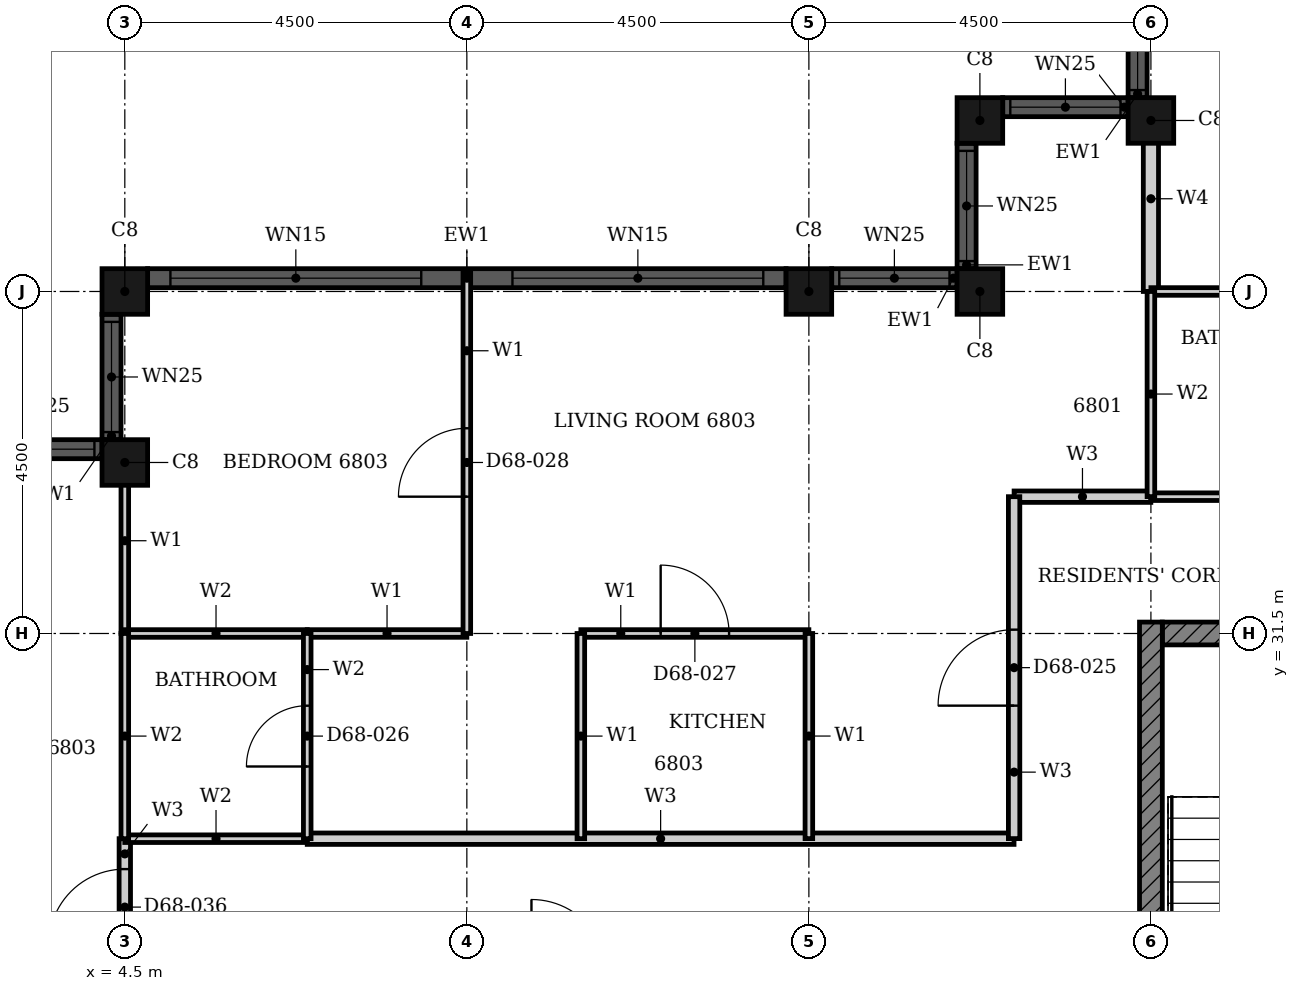
"""IFC4 building model, lengths in metres.
Left out: names, types, materials, properties, quantities, classifications, styles, units other than length and angle.
Written with IfcOpenShell. Run it as: python <this file> out.ifc"""

import sys

from ifc_helpers import new_model, si_unit, direction, frame, frame_2d, origin, origin_2d, place, context, subcontext, project, spatial, rectangle, hollow_rectangle, extrude, element, fill, save


model = new_model("IFC4")
c1 = context("Model", 3, precision=1e-05, world=origin(), true_north=direction((0.0, 1.0)))
c2 = subcontext(c1, "Body", "Model", "MODEL_VIEW")
j1 = project(units=[si_unit("LENGTHUNIT", "METRE"), si_unit("PLANEANGLEUNIT", "RADIAN")], contexts=[c1])
p1 = place(None, origin())
s1 = spatial("IfcSite", under=j1, at=p1, CompositionType="ELEMENT")
p2 = place(p1, origin())
s2 = spatial("IfcBuilding", under=s1, at=p2, CompositionType="ELEMENT")
p3 = place(p2, frame((0.0, 0.0, 267.5)))
s3 = spatial("IfcBuildingStorey", under=s2, at=p3, CompositionType="ELEMENT", Elevation=267.5)
for number, where, z_axis, x_axis in (
    (1, (18.0, 38.25, 0.0), (0.0, 0.0, 1.0), (1.0, 0.0, 0.0)),
    (2, (15.75, 38.25, 0.0), (0.0, 0.0, 1.0), (1.0, 0.0, 0.0)),
    (3, (15.75, 36.0, 0.0), (0.0, 0.0, 1.0), (1.0, 0.0, 0.0)),
    (4, (13.5, 36.0, 0.0), (0.0, 0.0, 1.0), (1.0, 0.0, 0.0)),
    (5, (4.5, 36.0, 0.0), (0.0, 0.0, 1.0), (1.0, 0.0, 0.0)),
    (6, (4.5, 33.75, 0.0), (0.0, 0.0, 1.0), (1.0, 0.0, 0.0)),
):
    element("IfcColumn", number, at=place(p3, frame(where, z_axis=z_axis, x_axis=x_axis)), inside=s3, PredefinedType="COLUMN", context=c2, shape_type="SweptSolid", body=[
        extrude(hollow_rectangle(XDim=0.6, YDim=0.6, WallThickness=0.02, at=origin_2d()), origin(), (0.0, 0.0, 1.0), 3.7),
    ])
p4 = place(p3, frame((17.825, 40.2, 0.0), z_axis=(0.0, 0.0, 1.0), x_axis=(0.0, -1.0, 0.0)))
e7 = element("IfcWall", 7, at=p4, inside=s3, PredefinedType="SOLIDWALL", context=c2, shape_type="SweptSolid", body=[
    extrude(rectangle(XDim=1.65, YDim=0.25, at=frame_2d((0.825, 0.0))), origin(), (0.0, 0.0, 1.0), 3.7),
])
p5 = place(p4, frame((0.1, 0.0, 0.9)))
e8 = element("IfcOpeningElement", 8, at=p5, cuts=e7, PredefinedType="OPENING", context=c2, shape_type="SweptSolid", body=[
    extrude(rectangle(XDim=1.45, YDim=1.85, at=frame_2d((0.725, 0.925))), frame((0.0, 0.135, 0.0), z_axis=(0.0, -1.0, 0.0), x_axis=(1.0, 0.0, 0.0)), (0.0, 0.0, 1.0), 0.27),
])
p6 = place(p3, frame((17.7, 38.425, 0.0), z_axis=(0.0, 0.0, 1.0), x_axis=(-1.0, 0.0, 0.0)))
e9 = element("IfcWall", 9, at=p6, inside=s3, PredefinedType="SOLIDWALL", context=c2, shape_type="SweptSolid", body=[
    extrude(rectangle(XDim=1.65, YDim=0.25, at=frame_2d((0.825, 0.0))), origin(), (0.0, 0.0, 1.0), 3.7),
])
p7 = place(p6, frame((0.1, 0.0, 0.9)))
e10 = element("IfcOpeningElement", 10, at=p7, cuts=e9, PredefinedType="OPENING", context=c2, shape_type="SweptSolid", body=[
    extrude(rectangle(XDim=1.45, YDim=1.85, at=frame_2d((0.725, 0.925))), frame((0.0, 0.135, 0.0), z_axis=(0.0, -1.0, 0.0), x_axis=(1.0, 0.0, 0.0)), (0.0, 0.0, 1.0), 0.27),
])
p8 = place(p3, frame((15.575, 37.95, 0.0), z_axis=(0.0, 0.0, 1.0), x_axis=(0.0, -1.0, 0.0)))
e11 = element("IfcWall", 11, at=p8, inside=s3, PredefinedType="SOLIDWALL", context=c2, shape_type="SweptSolid", body=[
    extrude(rectangle(XDim=1.65, YDim=0.25, at=frame_2d((0.825, 0.0))), origin(), (0.0, 0.0, 1.0), 3.7),
])
p9 = place(p8, frame((0.1, 0.0, 0.9)))
e12 = element("IfcOpeningElement", 12, at=p9, cuts=e11, PredefinedType="OPENING", context=c2, shape_type="SweptSolid", body=[
    extrude(rectangle(XDim=1.45, YDim=1.85, at=frame_2d((0.725, 0.925))), frame((0.0, 0.135, 0.0), z_axis=(0.0, -1.0, 0.0), x_axis=(1.0, 0.0, 0.0)), (0.0, 0.0, 1.0), 0.27),
])
p10 = place(p3, frame((15.45, 36.175, 0.0), z_axis=(0.0, 0.0, 1.0), x_axis=(-1.0, 0.0, 0.0)))
e13 = element("IfcWall", 13, at=p10, inside=s3, PredefinedType="SOLIDWALL", context=c2, shape_type="SweptSolid", body=[
    extrude(rectangle(XDim=1.65, YDim=0.25, at=frame_2d((0.825, 0.0))), origin(), (0.0, 0.0, 1.0), 3.7),
])
p11 = place(p10, frame((0.1, 0.0, 0.9)))
e14 = element("IfcOpeningElement", 14, at=p11, cuts=e13, PredefinedType="OPENING", context=c2, shape_type="SweptSolid", body=[
    extrude(rectangle(XDim=1.45, YDim=1.85, at=frame_2d((0.725, 0.925))), frame((0.0, 0.135, 0.0), z_axis=(0.0, -1.0, 0.0), x_axis=(1.0, 0.0, 0.0)), (0.0, 0.0, 1.0), 0.27),
])
p12 = place(p3, frame((13.2, 36.175, 0.0), z_axis=(0.0, 0.0, 1.0), x_axis=(-1.0, 0.0, 0.0)))
e15 = element("IfcWall", 15, at=p12, inside=s3, PredefinedType="SOLIDWALL", context=c2, shape_type="SweptSolid", body=[
    extrude(rectangle(XDim=8.4, YDim=0.25, at=frame_2d((4.2, 0.0))), origin(), (0.0, 0.0, 1.0), 3.7),
])
p13 = place(p12, frame((0.3, 0.0, 0.45)))
e16 = element("IfcOpeningElement", 16, at=p13, cuts=e15, PredefinedType="OPENING", context=c2, shape_type="SweptSolid", body=[
    extrude(rectangle(XDim=3.3, YDim=2.3, at=frame_2d((1.65, 1.15))), frame((0.0, 0.135, 0.0), z_axis=(0.0, -1.0, 0.0), x_axis=(1.0, 0.0, 0.0)), (0.0, 0.0, 1.0), 0.27),
])
p14 = place(p12, frame((4.8, 0.0, 0.45)))
e17 = element("IfcOpeningElement", 17, at=p14, cuts=e15, PredefinedType="OPENING", context=c2, shape_type="SweptSolid", body=[
    extrude(rectangle(XDim=3.3, YDim=2.3, at=frame_2d((1.65, 1.15))), frame((0.0, 0.135, 0.0), z_axis=(0.0, -1.0, 0.0), x_axis=(1.0, 0.0, 0.0)), (0.0, 0.0, 1.0), 0.27),
])
p15 = place(p3, frame((4.325, 35.7, 0.0), z_axis=(0.0, 0.0, 1.0), x_axis=(0.0, -1.0, 0.0)))
e18 = element("IfcWall", 18, at=p15, inside=s3, PredefinedType="SOLIDWALL", context=c2, shape_type="SweptSolid", body=[
    extrude(rectangle(XDim=1.65, YDim=0.25, at=frame_2d((0.825, 0.0))), origin(), (0.0, 0.0, 1.0), 3.7),
])
p16 = place(p15, frame((0.1, 0.0, 0.9)))
e19 = element("IfcOpeningElement", 19, at=p16, cuts=e18, PredefinedType="OPENING", context=c2, shape_type="SweptSolid", body=[
    extrude(rectangle(XDim=1.45, YDim=1.85, at=frame_2d((0.725, 0.925))), frame((0.0, 0.135, 0.0), z_axis=(0.0, -1.0, 0.0), x_axis=(1.0, 0.0, 0.0)), (0.0, 0.0, 1.0), 0.27),
])
p17 = place(p3, frame((4.2, 33.925, 0.0), z_axis=(0.0, 0.0, 1.0), x_axis=(-1.0, 0.0, 0.0)))
e20 = element("IfcWall", 20, at=p17, inside=s3, PredefinedType="SOLIDWALL", context=c2, shape_type="SweptSolid", body=[
    extrude(rectangle(XDim=1.65, YDim=0.25, at=frame_2d((0.825, 0.0))), origin(), (0.0, 0.0, 1.0), 3.7),
])
p18 = place(p17, frame((0.1, 0.0, 0.9)))
e21 = element("IfcOpeningElement", 21, at=p18, cuts=e20, PredefinedType="OPENING", context=c2, shape_type="SweptSolid", body=[
    extrude(rectangle(XDim=1.45, YDim=1.85, at=frame_2d((0.725, 0.925))), frame((0.0, 0.135, 0.0), z_axis=(0.0, -1.0, 0.0), x_axis=(1.0, 0.0, 0.0)), (0.0, 0.0, 1.0), 0.27),
])
p19 = place(p3, frame((18.15, 31.5, 0.0), z_axis=(0.0, 0.0, 1.0), x_axis=(1.0, 0.0, 0.0)))
e22 = element("IfcWall", 22, at=p19, inside=s3, PredefinedType="SHEAR", context=c2, shape_type="SweptSolid", body=[
    extrude(rectangle(XDim=9.368, YDim=0.3, at=frame_2d((4.684, 0.0))), origin(), (0.0, 0.0, 1.0), 3.4),
])
p20 = place(p19, frame((4.736, 0.0, 0.0)))
e23 = element("IfcOpeningElement", 23, at=p20, cuts=e22, PredefinedType="OPENING", context=c2, shape_type="SweptSolid", body=[
    extrude(rectangle(XDim=1.8, YDim=2.1, at=frame_2d((0.9, 1.05))), frame((0.0, 0.16, 0.0), z_axis=(0.0, -1.0, 0.0), x_axis=(1.0, 0.0, 0.0)), (0.0, 0.0, 1.0), 0.32),
])
p21 = place(p3, frame((18.0, 22.35, 0.0), z_axis=(0.0, 0.0, 1.0), x_axis=(0.0, 1.0, 0.0)))
e24 = element("IfcWall", 24, at=p21, inside=s3, PredefinedType="SHEAR", context=c2, shape_type="SweptSolid", body=[
    extrude(rectangle(XDim=9.3, YDim=0.3, at=frame_2d((4.65, 0.0))), origin(), (0.0, 0.0, 1.0), 3.4),
])
p22 = place(p3, frame((6.9, 28.8, 0.0), z_axis=(0.0, 0.0, 1.0), x_axis=(1.0, 0.0, 0.0)))
e25 = element("IfcWall", 25, at=p22, inside=s3, PredefinedType="PARTITIONING", context=c2, shape_type="SweptSolid", body=[
    extrude(rectangle(XDim=9.299, YDim=0.15, at=frame_2d((4.649, 0.0))), origin(), (0.0, 0.0, 1.0), 3.4),
])
p23 = place(p3, frame((16.2, 33.3, 0.0), z_axis=(0.0, 0.0, 1.0), x_axis=(1.0, 0.0, 0.0)))
e26 = element("IfcWall", 26, at=p23, inside=s3, PredefinedType="PARTITIONING", context=c2, shape_type="SweptSolid", body=[
    extrude(rectangle(XDim=1.799, YDim=0.15, at=frame_2d((0.899, 0.0))), origin(), (0.0, 0.0, 1.0), 3.4),
])
p24 = place(p3, frame((16.2, 28.801, 0.0), z_axis=(0.0, 0.0, 1.0), x_axis=(0.0, 1.0, 0.0)))
e27 = element("IfcWall", 27, at=p24, inside=s3, PredefinedType="PARTITIONING", context=c2, shape_type="SweptSolid", body=[
    extrude(rectangle(XDim=4.499, YDim=0.15, at=frame_2d((2.25, 0.0))), origin(), (0.0, 0.0, 1.0), 3.4),
])
p25 = place(p24, frame((1.75, 0.0, 0.0)))
e28 = element("IfcOpeningElement", 28, at=p25, cuts=e27, PredefinedType="OPENING", context=c2, shape_type="SweptSolid", body=[
    extrude(rectangle(XDim=1.0, YDim=2.2, at=frame_2d((0.5, 1.1))), frame((0.0, 0.085, 0.0), z_axis=(0.0, -1.0, 0.0), x_axis=(1.0, 0.0, 0.0)), (0.0, 0.0, 1.0), 0.17),
])
p26 = place(p3, frame((4.5, 27.0, 0.0), z_axis=(0.0, 0.0, 1.0), x_axis=(0.0, 1.0, 0.0)))
e29 = element("IfcWall", 29, at=p26, inside=s3, PredefinedType="PARTITIONING", context=c2, shape_type="SweptSolid", body=[
    extrude(rectangle(XDim=1.8, YDim=0.15, at=frame_2d((0.9, 0.0))), origin(), (0.0, 0.0, 1.0), 3.4),
])
p27 = place(p26, frame((0.4, 0.0, 0.0)))
e30 = element("IfcOpeningElement", 30, at=p27, cuts=e29, PredefinedType="OPENING", context=c2, shape_type="SweptSolid", body=[
    extrude(rectangle(XDim=1.0, YDim=2.1, at=frame_2d((0.5, 1.05))), frame((0.0, 0.085, 0.0), z_axis=(0.0, -1.0, 0.0), x_axis=(1.0, 0.0, 0.0)), (0.0, 0.0, 1.0), 0.17),
])
p28 = place(p3, frame((6.9, 31.5, 0.0), z_axis=(0.0, 0.0, 1.0), x_axis=(1.0, 0.0, 0.0)))
e31 = element("IfcWall", 31, at=p28, inside=s3, PredefinedType="PARTITIONING", context=c2, shape_type="SweptSolid", body=[
    extrude(rectangle(XDim=2.1, YDim=0.1, at=frame_2d((1.05, 0.0))), origin(), (0.0, 0.0, 1.0), 2.68),
])
p29 = place(p3, frame((10.5, 31.5, 0.0), z_axis=(0.0, 0.0, 1.0), x_axis=(1.0, 0.0, 0.0)))
e32 = element("IfcWall", 32, at=p29, inside=s3, PredefinedType="PARTITIONING", context=c2, shape_type="SweptSolid", body=[
    extrude(rectangle(XDim=3.0, YDim=0.1, at=frame_2d((1.5, 0.0))), origin(), (0.0, 0.0, 1.0), 2.68),
])
p30 = place(p29, frame((1.05, 0.0, 0.0)))
e33 = element("IfcOpeningElement", 33, at=p30, cuts=e32, PredefinedType="OPENING", context=c2, shape_type="SweptSolid", body=[
    extrude(rectangle(XDim=0.9, YDim=2.1, at=frame_2d((0.45, 1.05))), frame((0.0, 0.06, 0.0), z_axis=(0.0, -1.0, 0.0), x_axis=(1.0, 0.0, 0.0)), (0.0, 0.0, 1.0), 0.12),
])
p31 = place(p3, frame((10.5, 28.8, 0.0), z_axis=(0.0, 0.0, 1.0), x_axis=(0.0, 1.0, 0.0)))
e34 = element("IfcWall", 34, at=p31, inside=s3, PredefinedType="PARTITIONING", context=c2, shape_type="SweptSolid", body=[
    extrude(rectangle(XDim=2.7, YDim=0.1, at=frame_2d((1.35, 0.0))), origin(), (0.0, 0.0, 1.0), 3.4),
])
p32 = place(p3, frame((13.5, 28.801, 0.0), z_axis=(0.0, 0.0, 1.0), x_axis=(0.0, 1.0, 0.0)))
e35 = element("IfcWall", 35, at=p32, inside=s3, PredefinedType="PARTITIONING", context=c2, shape_type="SweptSolid", body=[
    extrude(rectangle(XDim=2.699, YDim=0.1, at=frame_2d((1.35, 0.0))), origin(), (0.0, 0.0, 1.0), 2.48),
])
p33 = place(p3, frame((4.5, 31.501, 0.0), z_axis=(0.0, 0.0, 1.0), x_axis=(0.0, 1.0, 0.0)))
e36 = element("IfcWall", 36, at=p33, inside=s3, PredefinedType="PARTITIONING", context=c2, shape_type="SweptSolid", body=[
    extrude(rectangle(XDim=2.439, YDim=0.1, at=frame_2d((1.219, 0.0))), origin(), (0.0, 0.0, 1.0), 3.4),
])
p34 = place(p3, frame((9.0, 31.5, 0.0), z_axis=(0.0, 0.0, 1.0), x_axis=(0.0, 1.0, 0.0)))
e37 = element("IfcWall", 37, at=p34, inside=s3, PredefinedType="PARTITIONING", context=c2, shape_type="SweptSolid", body=[
    extrude(rectangle(XDim=4.74, YDim=0.1, at=frame_2d((2.37, 0.0))), origin(), (0.0, 0.0, 1.0), 3.4),
])
p35 = place(p34, frame((1.8, 0.0, 0.0)))
e38 = element("IfcOpeningElement", 38, at=p35, cuts=e37, PredefinedType="OPENING", context=c2, shape_type="SweptSolid", body=[
    extrude(rectangle(XDim=0.9, YDim=2.1, at=frame_2d((0.45, 1.05))), frame((0.0, 0.06, 0.0), z_axis=(0.0, -1.0, 0.0), x_axis=(1.0, 0.0, 0.0)), (0.0, 0.0, 1.0), 0.12),
])
p36 = place(p3, frame((18.0, 36.0, 0.0), z_axis=(0.0, 0.0, 1.0), x_axis=(0.0, 1.0, 0.0)))
e39 = element("IfcWall", 39, at=p36, inside=s3, PredefinedType="PARTITIONING", context=c2, shape_type="SweptSolid", body=[
    extrude(rectangle(XDim=2.44, YDim=0.2, at=frame_2d((1.22, 0.0))), origin(), (0.0, 0.0, 1.0), 3.4),
])
p37 = place(p3, frame((4.5, 28.8, 0.0), z_axis=(0.0, 0.0, 1.0), x_axis=(1.0, 0.0, 0.0)))
e40 = element("IfcWall", 40, at=p37, inside=s3, PredefinedType="PARTITIONING", context=c2, shape_type="SweptSolid", body=[
    extrude(rectangle(XDim=2.4, YDim=0.1, at=frame_2d((1.2, 0.0))), origin(), (0.0, 0.0, 1.0), 3.4),
])
p38 = place(p3, frame((4.5, 31.5, 0.0), z_axis=(0.0, 0.0, 1.0), x_axis=(1.0, 0.0, 0.0)))
e41 = element("IfcWall", 41, at=p38, inside=s3, PredefinedType="PARTITIONING", context=c2, shape_type="SweptSolid", body=[
    extrude(rectangle(XDim=2.4, YDim=0.1, at=frame_2d((1.2, 0.0))), origin(), (0.0, 0.0, 1.0), 2.68),
])
for number, where, z_axis, x_axis in (
    (42, (18.0, 33.3, 0.0), (0.0, 0.0, 1.0), (1.0, 0.0, 0.0)),
    (43, (18.0, 36.0, 0.0), (0.0, 0.0, 1.0), (1.0, 0.0, 0.0)),
):
    element("IfcWall", number, at=place(p3, frame(where, z_axis=z_axis, x_axis=x_axis)), inside=s3, PredefinedType="PARTITIONING", context=c2, shape_type="SweptSolid", body=[
        extrude(rectangle(XDim=2.4, YDim=0.1, at=frame_2d((1.2, 0.0))), origin(), (0.0, 0.0, 1.0), 3.4),
    ])
p39 = place(p3, frame((18.0, 33.301, 0.0), z_axis=(0.0, 0.0, 1.0), x_axis=(0.0, 1.0, 0.0)))
e44 = element("IfcWall", 44, at=p39, inside=s3, PredefinedType="PARTITIONING", context=c2, shape_type="SweptSolid", body=[
    extrude(rectangle(XDim=2.699, YDim=0.1, at=frame_2d((1.35, 0.0))), origin(), (0.0, 0.0, 1.0), 3.4),
])
p40 = place(p3, frame((4.5, 28.8, 0.0), z_axis=(0.0, 0.0, 1.0), x_axis=(0.0, 1.0, 0.0)))
e45 = element("IfcWall", 45, at=p40, inside=s3, PredefinedType="PARTITIONING", context=c2, shape_type="SweptSolid", body=[
    extrude(rectangle(XDim=2.7, YDim=0.1, at=frame_2d((1.35, 0.0))), origin(), (0.0, 0.0, 1.0), 3.4),
])
p41 = place(p3, frame((6.9, 28.8, 0.0), z_axis=(0.0, 0.0, 1.0), x_axis=(0.0, 1.0, 0.0)))
e46 = element("IfcWall", 46, at=p41, inside=s3, PredefinedType="PARTITIONING", context=c2, shape_type="SweptSolid", body=[
    extrude(rectangle(XDim=2.7, YDim=0.1, at=frame_2d((1.35, 0.0))), origin(), (0.0, 0.0, 1.0), 3.4),
])
p42 = place(p41, frame((0.95, 0.0, 0.0)))
e47 = element("IfcOpeningElement", 47, at=p42, cuts=e46, PredefinedType="OPENING", context=c2, shape_type="SweptSolid", body=[
    extrude(rectangle(XDim=0.8, YDim=2.1, at=frame_2d((0.4, 1.05))), frame((0.0, 0.06, 0.0), z_axis=(0.0, -1.0, 0.0), x_axis=(1.0, 0.0, 0.0)), (0.0, 0.0, 1.0), 0.12),
])
p43 = place(p5, origin())
e48 = element("IfcWindow", 48, at=p43, inside=s3, PartitioningType="SINGLE_PANEL", PredefinedType="WINDOW", context=c2, shape_type="SweptSolid", body=[
    extrude(rectangle(XDim=1.45, YDim=1.85, at=frame_2d((0.725, 0.925))), frame((0.0, 0.03, 0.0), z_axis=(0.0, -1.0, 0.0), x_axis=(1.0, 0.0, 0.0)), (0.0, 0.0, 1.0), 0.06),
])
fill(e8, e48)
p44 = place(p7, origin())
e49 = element("IfcWindow", 49, at=p44, inside=s3, PartitioningType="SINGLE_PANEL", PredefinedType="WINDOW", context=c2, shape_type="SweptSolid", body=[
    extrude(rectangle(XDim=1.45, YDim=1.85, at=frame_2d((0.725, 0.925))), frame((0.0, 0.03, 0.0), z_axis=(0.0, -1.0, 0.0), x_axis=(1.0, 0.0, 0.0)), (0.0, 0.0, 1.0), 0.06),
])
fill(e10, e49)
p45 = place(p9, origin())
e50 = element("IfcWindow", 50, at=p45, inside=s3, PartitioningType="SINGLE_PANEL", PredefinedType="WINDOW", context=c2, shape_type="SweptSolid", body=[
    extrude(rectangle(XDim=1.45, YDim=1.85, at=frame_2d((0.725, 0.925))), frame((0.0, 0.03, 0.0), z_axis=(0.0, -1.0, 0.0), x_axis=(1.0, 0.0, 0.0)), (0.0, 0.0, 1.0), 0.06),
])
fill(e12, e50)
p46 = place(p11, origin())
e51 = element("IfcWindow", 51, at=p46, inside=s3, PartitioningType="SINGLE_PANEL", PredefinedType="WINDOW", context=c2, shape_type="SweptSolid", body=[
    extrude(rectangle(XDim=1.45, YDim=1.85, at=frame_2d((0.725, 0.925))), frame((0.0, 0.03, 0.0), z_axis=(0.0, -1.0, 0.0), x_axis=(1.0, 0.0, 0.0)), (0.0, 0.0, 1.0), 0.06),
])
fill(e14, e51)
p47 = place(p13, origin())
e52 = element("IfcWindow", 52, at=p47, inside=s3, PartitioningType="SINGLE_PANEL", PredefinedType="WINDOW", context=c2, shape_type="SweptSolid", body=[
    extrude(rectangle(XDim=3.3, YDim=2.3, at=frame_2d((1.65, 1.15))), frame((0.0, 0.03, 0.0), z_axis=(0.0, -1.0, 0.0), x_axis=(1.0, 0.0, 0.0)), (0.0, 0.0, 1.0), 0.06),
])
fill(e16, e52)
p48 = place(p14, origin())
e53 = element("IfcWindow", 53, at=p48, inside=s3, PartitioningType="SINGLE_PANEL", PredefinedType="WINDOW", context=c2, shape_type="SweptSolid", body=[
    extrude(rectangle(XDim=3.3, YDim=2.3, at=frame_2d((1.65, 1.15))), frame((0.0, 0.03, 0.0), z_axis=(0.0, -1.0, 0.0), x_axis=(1.0, 0.0, 0.0)), (0.0, 0.0, 1.0), 0.06),
])
fill(e17, e53)
p49 = place(p16, origin())
e54 = element("IfcWindow", 54, at=p49, inside=s3, PartitioningType="SINGLE_PANEL", PredefinedType="WINDOW", context=c2, shape_type="SweptSolid", body=[
    extrude(rectangle(XDim=1.45, YDim=1.85, at=frame_2d((0.725, 0.925))), frame((0.0, 0.03, 0.0), z_axis=(0.0, -1.0, 0.0), x_axis=(1.0, 0.0, 0.0)), (0.0, 0.0, 1.0), 0.06),
])
fill(e19, e54)
p50 = place(p18, origin())
e55 = element("IfcWindow", 55, at=p50, inside=s3, PartitioningType="SINGLE_PANEL", PredefinedType="WINDOW", context=c2, shape_type="SweptSolid", body=[
    extrude(rectangle(XDim=1.45, YDim=1.85, at=frame_2d((0.725, 0.925))), frame((0.0, 0.03, 0.0), z_axis=(0.0, -1.0, 0.0), x_axis=(1.0, 0.0, 0.0)), (0.0, 0.0, 1.0), 0.06),
])
fill(e21, e55)
p51 = place(p25, origin())
e56 = element("IfcDoor", 56, at=p51, inside=s3, OperationType="SINGLE_SWING_LEFT", PredefinedType="DOOR", context=c2, shape_type="SweptSolid", body=[
    extrude(rectangle(XDim=1.0, YDim=2.2, at=frame_2d((0.5, 1.1))), frame((0.0, 0.025, 0.0), z_axis=(0.0, -1.0, 0.0), x_axis=(1.0, 0.0, 0.0)), (0.0, 0.0, 1.0), 0.05),
])
fill(e28, e56)
p52 = place(p42, origin())
e57 = element("IfcDoor", 57, at=p52, inside=s3, OperationType="SINGLE_SWING_LEFT", PredefinedType="DOOR", context=c2, shape_type="SweptSolid", body=[
    extrude(rectangle(XDim=0.8, YDim=2.1, at=frame_2d((0.4, 1.05))), frame((0.0, 0.025, 0.0), z_axis=(0.0, -1.0, 0.0), x_axis=(1.0, 0.0, 0.0)), (0.0, 0.0, 1.0), 0.05),
])
fill(e47, e57)
p53 = place(p30, origin())
e58 = element("IfcDoor", 58, at=p53, inside=s3, OperationType="SINGLE_SWING_RIGHT", PredefinedType="DOOR", context=c2, shape_type="SweptSolid", body=[
    extrude(rectangle(XDim=0.9, YDim=2.1, at=frame_2d((0.45, 1.05))), frame((0.0, 0.025, 0.0), z_axis=(0.0, -1.0, 0.0), x_axis=(1.0, 0.0, 0.0)), (0.0, 0.0, 1.0), 0.05),
])
fill(e33, e58)
p54 = place(p35, origin())
e59 = element("IfcDoor", 59, at=p54, inside=s3, OperationType="SINGLE_SWING_RIGHT", PredefinedType="DOOR", context=c2, shape_type="SweptSolid", body=[
    extrude(rectangle(XDim=0.9, YDim=2.1, at=frame_2d((0.45, 1.05))), frame((0.0, 0.025, 0.0), z_axis=(0.0, -1.0, 0.0), x_axis=(1.0, 0.0, 0.0)), (0.0, 0.0, 1.0), 0.05),
])
fill(e38, e59)
p55 = place(p27, origin())
e60 = element("IfcDoor", 60, at=p55, inside=s3, OperationType="SINGLE_SWING_RIGHT", PredefinedType="DOOR", context=c2, shape_type="SweptSolid", body=[
    extrude(rectangle(XDim=1.0, YDim=2.1, at=frame_2d((0.5, 1.05))), frame((0.0, 0.025, 0.0), z_axis=(0.0, -1.0, 0.0), x_axis=(1.0, 0.0, 0.0)), (0.0, 0.0, 1.0), 0.05),
])
fill(e30, e60)
save(model, sys.argv[1])
